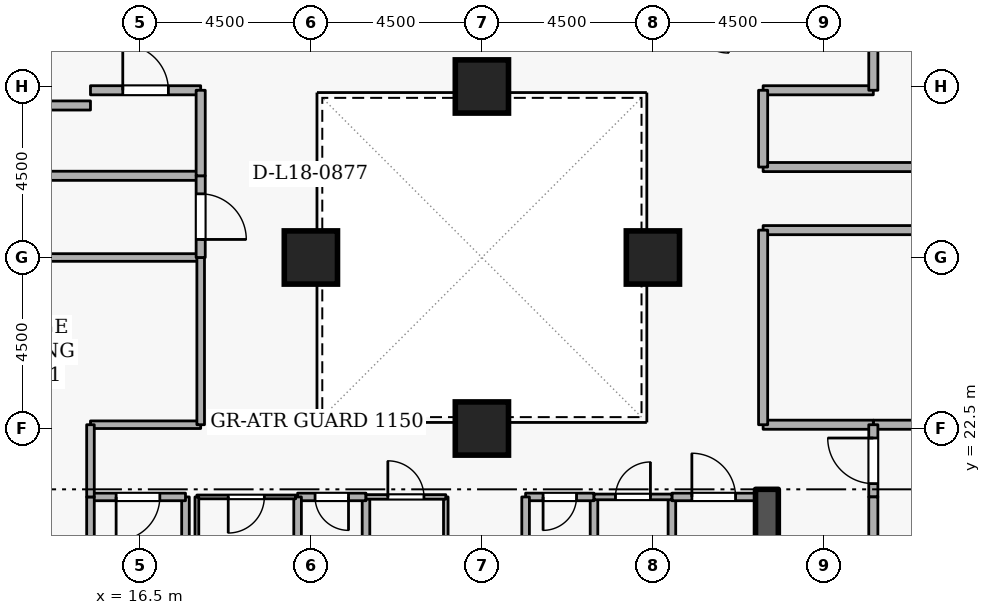
"""IFC4 building model, lengths in metres.
Left out: names, types, materials, properties, quantities, classifications, styles, units other than length and angle.
Written with IfcOpenShell. Run it as: python <this file> out.ifc"""

import sys

from ifc_helpers import new_model, si_unit, direction, frame, frame_2d, origin, origin_2d, place, context, subcontext, project, spatial, rectangle, extrude, element, fill, save


model = new_model("IFC4")
c1 = context("Model", 3, precision=1e-05, world=origin(), true_north=direction((0.0, 1.0)))
c2 = subcontext(c1, "Body", "Model", "MODEL_VIEW")
j1 = project(units=[si_unit("LENGTHUNIT", "METRE"), si_unit("PLANEANGLEUNIT", "RADIAN")], contexts=[c1])
p1 = place(None, origin())
s1 = spatial("IfcSite", under=j1, at=p1, CompositionType="ELEMENT")
p2 = place(p1, origin())
s2 = spatial("IfcBuilding", under=s1, at=p2, CompositionType="ELEMENT")
p3 = place(p2, frame((0.0, 0.0, 71.7)))
s3 = spatial("IfcBuildingStorey", under=s2, at=p3, CompositionType="ELEMENT", Elevation=71.7)
p4 = place(p3, frame((33.0, 15.2, 0.0), z_axis=(0.0, 0.0, 1.0), x_axis=(0.0, 1.0, 0.0)))
e1 = element("IfcWall", 1, at=p4, inside=s3, PredefinedType="SHEAR", context=c2, shape_type="SweptSolid", body=[
    extrude(rectangle(XDim=5.7, YDim=0.6, at=frame_2d((2.85, 0.0))), origin(), (0.0, 0.0, 1.0), 4.2),
])
for number, where, z_axis, x_axis in (
    (2, (25.5, 22.5, 0.0), (0.0, 0.0, 1.0), (1.0, 0.0, 0.0)),
    (3, (25.5, 31.5, 0.0), (0.0, 0.0, 1.0), (1.0, 0.0, 0.0)),
    (4, (21.0, 27.0, 0.0), (0.0, 0.0, 1.0), (1.0, 0.0, 0.0)),
    (5, (30.0, 27.0, 0.0), (0.0, 0.0, 1.0), (1.0, 0.0, 0.0)),
):
    element("IfcColumn", number, at=place(p3, frame(where, z_axis=z_axis, x_axis=x_axis)), inside=s3, PredefinedType="COLUMN", context=c2, shape_type="SweptSolid", body=[
        extrude(rectangle(XDim=1.4, YDim=1.4, at=origin_2d()), origin(), (0.0, 0.0, 1.0), 4.2),
    ])
p5 = place(p3, frame((17.7, 18.4, 0.0), z_axis=(0.0, 0.0, 1.0), x_axis=(0.0, 1.0, 0.0)))
e6 = element("IfcWall", 6, at=p5, inside=s3, PredefinedType="STANDARD", context=c2, shape_type="SweptSolid", body=[
    extrude(rectangle(XDim=2.3, YDim=0.2, at=frame_2d((1.15, 0.0))), origin(), (0.0, 0.0, 1.0), 3.065),
])
p6 = place(p3, frame((17.7, 20.7, 0.0), z_axis=(0.0, 0.0, 1.0), x_axis=(-1.0, 0.0, 0.0)))
e7 = element("IfcWall", 7, at=p6, inside=s3, PredefinedType="STANDARD", context=c2, shape_type="SweptSolid", body=[
    extrude(rectangle(XDim=2.5, YDim=0.2, at=frame_2d((1.25, 0.0))), origin(), (0.0, 0.0, 1.0), 3.86),
])
p7 = place(p6, frame((0.675, 0.0, 0.0)))
e8 = element("IfcOpeningElement", 8, at=p7, cuts=e7, PredefinedType="OPENING", context=c2, shape_type="SweptSolid", body=[
    extrude(rectangle(XDim=1.15, YDim=2.1, at=frame_2d((0.575, 1.05))), frame((0.0, 0.11, 0.0), z_axis=(0.0, -1.0, 0.0), x_axis=(1.0, 0.0, 0.0)), (0.0, 0.0, 1.0), 0.22),
])
p8 = place(p3, frame((15.2, 20.7, 0.0), z_axis=(0.0, 0.0, 1.0), x_axis=(0.0, -1.0, 0.0)))
e9 = element("IfcWall", 9, at=p8, inside=s3, PredefinedType="STANDARD", context=c2, shape_type="SweptSolid", body=[
    extrude(rectangle(XDim=5.7, YDim=0.2, at=frame_2d((2.85, 0.0))), origin(), (0.0, 0.0, 1.0), 3.86),
])
p9 = place(p8, frame((2.275, 0.0, 0.0)))
e10 = element("IfcOpeningElement", 10, at=p9, cuts=e9, PredefinedType="OPENING", context=c2, shape_type="SweptSolid", body=[
    extrude(rectangle(XDim=1.15, YDim=2.1, at=frame_2d((0.575, 1.05))), frame((0.0, 0.11, 0.0), z_axis=(0.0, -1.0, 0.0), x_axis=(1.0, 0.0, 0.0)), (0.0, 0.0, 1.0), 0.22),
])
p10 = place(p3, frame((28.45, 18.65, 0.0), z_axis=(0.0, 0.0, 1.0), x_axis=(0.0, 1.0, 0.0)))
e11 = element("IfcWall", 11, at=p10, inside=s3, PredefinedType="STANDARD", context=c2, shape_type="SweptSolid", body=[
    extrude(rectangle(XDim=2.05, YDim=0.2, at=frame_2d((1.025, 0.0))), origin(), (0.0, 0.0, 1.0), 3.86),
])
p11 = place(p3, frame((28.45, 20.7, 0.0), z_axis=(0.0, 0.0, 1.0), x_axis=(-1.0, 0.0, 0.0)))
e12 = element("IfcWall", 12, at=p11, inside=s3, PredefinedType="STANDARD", context=c2, shape_type="SweptSolid", body=[
    extrude(rectangle(XDim=1.8, YDim=0.2, at=frame_2d((0.9, 0.0))), origin(), (0.0, 0.0, 1.0), 3.86),
])
p12 = place(p11, frame((0.46, 0.0, 0.0)))
e13 = element("IfcOpeningElement", 13, at=p12, cuts=e12, PredefinedType="OPENING", context=c2, shape_type="SweptSolid", body=[
    extrude(rectangle(XDim=0.88, YDim=2.04, at=frame_2d((0.44, 1.02))), frame((0.0, 0.11, 0.0), z_axis=(0.0, -1.0, 0.0), x_axis=(1.0, 0.0, 0.0)), (0.0, 0.0, 1.0), 0.22),
])
for number, where, z_axis, x_axis in (
    (14, (26.65, 20.7, 0.0), (0.0, 0.0, 1.0), (0.0, -1.0, 0.0)),
    (15, (22.45, 18.65, 0.0), (0.0, 0.0, 1.0), (0.0, 1.0, 0.0)),
):
    element("IfcWall", number, at=place(p3, frame(where, z_axis=z_axis, x_axis=x_axis)), inside=s3, PredefinedType="STANDARD", context=c2, shape_type="SweptSolid", body=[
        extrude(rectangle(XDim=2.05, YDim=0.2, at=frame_2d((1.025, 0.0))), origin(), (0.0, 0.0, 1.0), 3.86),
    ])
p13 = place(p3, frame((22.45, 20.7, 0.0), z_axis=(0.0, 0.0, 1.0), x_axis=(-1.0, 0.0, 0.0)))
e16 = element("IfcWall", 16, at=p13, inside=s3, PredefinedType="STANDARD", context=c2, shape_type="SweptSolid", body=[
    extrude(rectangle(XDim=1.8, YDim=0.2, at=frame_2d((0.9, 0.0))), origin(), (0.0, 0.0, 1.0), 3.86),
])
p14 = place(p13, frame((0.46, 0.0, 0.0)))
e17 = element("IfcOpeningElement", 17, at=p14, cuts=e16, PredefinedType="OPENING", context=c2, shape_type="SweptSolid", body=[
    extrude(rectangle(XDim=0.88, YDim=2.04, at=frame_2d((0.44, 1.02))), frame((0.0, 0.11, 0.0), z_axis=(0.0, -1.0, 0.0), x_axis=(1.0, 0.0, 0.0)), (0.0, 0.0, 1.0), 0.22),
])
for number, where, z_axis, x_axis in (
    (18, (20.65, 20.7, 0.0), (0.0, 0.0, 1.0), (0.0, -1.0, 0.0)),
    (19, (30.5, 18.65, 0.0), (0.0, 0.0, 1.0), (0.0, 1.0, 0.0)),
):
    element("IfcWall", number, at=place(p3, frame(where, z_axis=z_axis, x_axis=x_axis)), inside=s3, PredefinedType="STANDARD", context=c2, shape_type="SweptSolid", body=[
        extrude(rectangle(XDim=2.05, YDim=0.2, at=frame_2d((1.025, 0.0))), origin(), (0.0, 0.0, 1.0), 3.86),
    ])
p15 = place(p3, frame((30.5, 20.7, 0.0), z_axis=(0.0, 0.0, 1.0), x_axis=(1.0, 0.0, 0.0)))
e20 = element("IfcWall", 20, at=p15, inside=s3, PredefinedType="STANDARD", context=c2, shape_type="SweptSolid", body=[
    extrude(rectangle(XDim=2.2, YDim=0.2, at=frame_2d((1.1, 0.0))), origin(), (0.0, 0.0, 1.0), 3.86),
])
p16 = place(p15, frame((0.525, 0.0, 0.0)))
e21 = element("IfcOpeningElement", 21, at=p16, cuts=e20, PredefinedType="OPENING", context=c2, shape_type="SweptSolid", body=[
    extrude(rectangle(XDim=1.15, YDim=2.1, at=frame_2d((0.575, 1.05))), frame((0.0, 0.11, 0.0), z_axis=(0.0, -1.0, 0.0), x_axis=(1.0, 0.0, 0.0)), (0.0, 0.0, 1.0), 0.22),
])
p17 = place(p3, frame((32.9, 27.72, 0.0), z_axis=(0.0, 0.0, 1.0), x_axis=(1.0, 0.0, 0.0)))
e22 = element("IfcWall", 22, at=p17, inside=s3, PredefinedType="STANDARD", context=c2, shape_type="SweptSolid", body=[
    extrude(rectangle(XDim=9.1, YDim=0.24, at=frame_2d((4.55, 0.0))), origin(), (0.0, 0.0, 1.0), 3.86),
])
p18 = place(p17, frame((3.95, 0.0, 0.0)))
e23 = element("IfcOpeningElement", 23, at=p18, cuts=e22, PredefinedType="OPENING", context=c2, shape_type="SweptSolid", body=[
    extrude(rectangle(XDim=1.2, YDim=2.1, at=frame_2d((0.6, 1.05))), frame((0.0, 0.13, 0.0), z_axis=(0.0, -1.0, 0.0), x_axis=(1.0, 0.0, 0.0)), (0.0, 0.0, 1.0), 0.26),
])
p19 = place(p3, frame((42.0, 22.6, 0.0), z_axis=(0.0, 0.0, 1.0), x_axis=(-1.0, 0.0, 0.0)))
e24 = element("IfcWall", 24, at=p19, inside=s3, PredefinedType="STANDARD", context=c2, shape_type="SweptSolid", body=[
    extrude(rectangle(XDim=6.2, YDim=0.24, at=frame_2d((3.1, 0.0))), origin(), (0.0, 0.0, 1.0), 3.86),
])
p20 = place(p3, frame((35.8, 22.6, 0.0), z_axis=(0.0, 0.0, 1.0), x_axis=(-1.0, 0.0, 0.0)))
e25 = element("IfcWall", 25, at=p20, inside=s3, PredefinedType="STANDARD", context=c2, shape_type="SweptSolid", body=[
    extrude(rectangle(XDim=2.9, YDim=0.24, at=frame_2d((1.45, 0.0))), origin(), (0.0, 0.0, 1.0), 3.86),
])
p21 = place(p3, frame((32.9, 22.6, 0.0), z_axis=(0.0, 0.0, 1.0), x_axis=(0.0, 1.0, 0.0)))
e26 = element("IfcWall", 26, at=p21, inside=s3, PredefinedType="STANDARD", context=c2, shape_type="SweptSolid", body=[
    extrude(rectangle(XDim=5.12, YDim=0.24, at=frame_2d((2.56, 0.0))), origin(), (0.0, 0.0, 1.0), 3.065),
])
p22 = place(p3, frame((32.9, 31.4, 0.0), z_axis=(0.0, 0.0, 1.0), x_axis=(1.0, 0.0, 0.0)))
e27 = element("IfcWall", 27, at=p22, inside=s3, PredefinedType="STANDARD", context=c2, shape_type="SweptSolid", body=[
    extrude(rectangle(XDim=2.9, YDim=0.24, at=frame_2d((1.45, 0.0))), origin(), (0.0, 0.0, 1.0), 3.86),
])
p23 = place(p3, frame((35.8, 31.4, 0.0), z_axis=(0.0, 0.0, 1.0), x_axis=(0.0, 1.0, 0.0)))
e28 = element("IfcWall", 28, at=p23, inside=s3, PredefinedType="STANDARD", context=c2, shape_type="SweptSolid", body=[
    extrude(rectangle(XDim=1.9, YDim=0.24, at=frame_2d((0.95, 0.0))), origin(), (0.0, 0.0, 1.0), 3.86),
])
p24 = place(p3, frame((42.0, 29.38, 0.0), z_axis=(0.0, 0.0, 1.0), x_axis=(-1.0, 0.0, 0.0)))
e29 = element("IfcWall", 29, at=p24, inside=s3, PredefinedType="STANDARD", context=c2, shape_type="SweptSolid", body=[
    extrude(rectangle(XDim=9.1, YDim=0.24, at=frame_2d((4.55, 0.0))), origin(), (0.0, 0.0, 1.0), 3.86),
])
p25 = place(p24, frame((3.95, 0.0, 0.0)))
e30 = element("IfcOpeningElement", 30, at=p25, cuts=e29, PredefinedType="OPENING", context=c2, shape_type="SweptSolid", body=[
    extrude(rectangle(XDim=1.2, YDim=2.1, at=frame_2d((0.6, 1.05))), frame((0.0, 0.13, 0.0), z_axis=(0.0, -1.0, 0.0), x_axis=(1.0, 0.0, 0.0)), (0.0, 0.0, 1.0), 0.26),
])
p26 = place(p3, frame((32.9, 29.38, 0.0), z_axis=(0.0, 0.0, 1.0), x_axis=(0.0, 1.0, 0.0)))
e31 = element("IfcWall", 31, at=p26, inside=s3, PredefinedType="STANDARD", context=c2, shape_type="SweptSolid", body=[
    extrude(rectangle(XDim=2.02, YDim=0.24, at=frame_2d((1.01, 0.0))), origin(), (0.0, 0.0, 1.0), 3.065),
])
p27 = place(p3, frame((18.1, 22.6, 0.0), z_axis=(0.0, 0.0, 1.0), x_axis=(-1.0, 0.0, 0.0)))
e32 = element("IfcWall", 32, at=p27, inside=s3, PredefinedType="STANDARD", context=c2, shape_type="SweptSolid", body=[
    extrude(rectangle(XDim=2.9, YDim=0.2, at=frame_2d((1.45, 0.0))), origin(), (0.0, 0.0, 1.0), 3.86),
])
p28 = place(p3, frame((15.2, 22.6, 0.0), z_axis=(0.0, 0.0, 1.0), x_axis=(0.0, -1.0, 0.0)))
e33 = element("IfcWall", 33, at=p28, inside=s3, PredefinedType="STANDARD", context=c2, shape_type="SweptSolid", body=[
    extrude(rectangle(XDim=1.9, YDim=0.2, at=frame_2d((0.95, 0.0))), origin(), (0.0, 0.0, 1.0), 3.86),
])
p29 = place(p3, frame((10.95, 27.0, 0.0), z_axis=(0.0, 0.0, 1.0), x_axis=(1.0, 0.0, 0.0)))
e34 = element("IfcWall", 34, at=p29, inside=s3, PredefinedType="STANDARD", context=c2, shape_type="SweptSolid", body=[
    extrude(rectangle(XDim=7.15, YDim=0.2, at=frame_2d((3.575, 0.0))), origin(), (0.0, 0.0, 1.0), 3.245),
])
p30 = place(p3, frame((18.1, 27.0, 0.0), z_axis=(0.0, 0.0, 1.0), x_axis=(0.0, -1.0, 0.0)))
e35 = element("IfcWall", 35, at=p30, inside=s3, PredefinedType="STANDARD", context=c2, shape_type="SweptSolid", body=[
    extrude(rectangle(XDim=4.4, YDim=0.2, at=frame_2d((2.2, 0.0))), origin(), (0.0, 0.0, 1.0), 3.065),
])
p31 = place(p3, frame((10.95, 29.15, 0.0), z_axis=(0.0, 0.0, 1.0), x_axis=(1.0, 0.0, 0.0)))
e36 = element("IfcWall", 36, at=p31, inside=s3, PredefinedType="STANDARD", context=c2, shape_type="SweptSolid", body=[
    extrude(rectangle(XDim=7.15, YDim=0.24, at=frame_2d((3.575, 0.0))), origin(), (0.0, 0.0, 1.0), 3.86),
])
p32 = place(p3, frame((18.1, 29.15, 0.0), z_axis=(0.0, 0.0, 1.0), x_axis=(0.0, -1.0, 0.0)))
e37 = element("IfcWall", 37, at=p32, inside=s3, PredefinedType="STANDARD", context=c2, shape_type="SweptSolid", body=[
    extrude(rectangle(XDim=2.15, YDim=0.24, at=frame_2d((1.075, 0.0))), origin(), (0.0, 0.0, 1.0), 3.065),
])
p33 = place(p32, frame((0.475, 0.0, 0.0)))
e38 = element("IfcOpeningElement", 38, at=p33, cuts=e37, PredefinedType="OPENING", context=c2, shape_type="SweptSolid", body=[
    extrude(rectangle(XDim=1.2, YDim=2.1, at=frame_2d((0.6, 1.05))), frame((0.0, 0.13, 0.0), z_axis=(0.0, -1.0, 0.0), x_axis=(1.0, 0.0, 0.0)), (0.0, 0.0, 1.0), 0.26),
])
p34 = place(p3, frame((15.2, 31.4, 0.0), z_axis=(0.0, 0.0, 1.0), x_axis=(1.0, 0.0, 0.0)))
e39 = element("IfcWall", 39, at=p34, inside=s3, PredefinedType="STANDARD", context=c2, shape_type="SweptSolid", body=[
    extrude(rectangle(XDim=2.9, YDim=0.24, at=frame_2d((1.45, 0.0))), origin(), (0.0, 0.0, 1.0), 3.86),
])
p35 = place(p34, frame((0.85, 0.0, 0.0)))
e40 = element("IfcOpeningElement", 40, at=p35, cuts=e39, PredefinedType="OPENING", context=c2, shape_type="SweptSolid", body=[
    extrude(rectangle(XDim=1.2, YDim=2.1, at=frame_2d((0.6, 1.05))), frame((0.0, 0.13, 0.0), z_axis=(0.0, -1.0, 0.0), x_axis=(1.0, 0.0, 0.0)), (0.0, 0.0, 1.0), 0.26),
])
p36 = place(p3, frame((18.1, 31.4, 0.0), z_axis=(0.0, 0.0, 1.0), x_axis=(0.0, -1.0, 0.0)))
e41 = element("IfcWall", 41, at=p36, inside=s3, PredefinedType="STANDARD", context=c2, shape_type="SweptSolid", body=[
    extrude(rectangle(XDim=2.25, YDim=0.24, at=frame_2d((1.125, 0.0))), origin(), (0.0, 0.0, 1.0), 3.065),
])
p37 = place(p3, frame((10.95, 31.0, 0.0), z_axis=(0.0, 0.0, 1.0), x_axis=(1.0, 0.0, 0.0)))
e42 = element("IfcWall", 42, at=p37, inside=s3, PredefinedType="STANDARD", context=c2, shape_type="SweptSolid", body=[
    extrude(rectangle(XDim=4.25, YDim=0.24, at=frame_2d((2.125, 0.0))), origin(), (0.0, 0.0, 1.0), 3.86),
])
p38 = place(p3, frame((35.8, 20.7, 0.0), z_axis=(0.0, 0.0, 1.0), x_axis=(0.0, 1.0, 0.0)))
e43 = element("IfcWall", 43, at=p38, inside=s3, PredefinedType="STANDARD", context=c2, shape_type="SweptSolid", body=[
    extrude(rectangle(XDim=1.9, YDim=0.24, at=frame_2d((0.95, 0.0))), origin(), (0.0, 0.0, 1.0), 3.86),
])
p39 = place(p38, frame((0.35, 0.0, 0.0)))
e44 = element("IfcOpeningElement", 44, at=p39, cuts=e43, PredefinedType="OPENING", context=c2, shape_type="SweptSolid", body=[
    extrude(rectangle(XDim=1.2, YDim=2.1, at=frame_2d((0.6, 1.05))), frame((0.0, 0.13, 0.0), z_axis=(0.0, -1.0, 0.0), x_axis=(1.0, 0.0, 0.0)), (0.0, 0.0, 1.0), 0.26),
])
p40 = place(p3, frame((35.8, 17.648, 0.0), z_axis=(0.0, 0.0, 1.0), x_axis=(0.0, 1.0, 0.0)))
e45 = element("IfcWall", 45, at=p40, inside=s3, PredefinedType="STANDARD", context=c2, shape_type="SweptSolid", body=[
    extrude(rectangle(XDim=3.052, YDim=0.24, at=frame_2d((1.526, 0.0))), origin(), (0.0, 0.0, 1.0), 3.86),
])
p41 = place(p3, frame((20.6, 20.7, 0.0), z_axis=(0.0, 0.0, 1.0), x_axis=(-1.0, 0.0, 0.0)))
e46 = element("IfcWall", 46, at=p41, inside=s3, PredefinedType="PARTITIONING", context=c2, shape_type="SweptSolid", body=[
    extrude(rectangle(XDim=2.6, YDim=0.1, at=frame_2d((1.3, 0.0))), origin(), (0.0, 0.0, 1.0), 3.86),
])
p42 = place(p41, frame((0.825, 0.0, 0.0)))
e47 = element("IfcOpeningElement", 47, at=p42, cuts=e46, PredefinedType="OPENING", context=c2, shape_type="SweptSolid", body=[
    extrude(rectangle(XDim=0.95, YDim=2.1, at=frame_2d((0.475, 1.05))), frame((0.0, 0.06, 0.0), z_axis=(0.0, -1.0, 0.0), x_axis=(1.0, 0.0, 0.0)), (0.0, 0.0, 1.0), 0.12),
])
p43 = place(p3, frame((18.0, 20.7, 0.0), z_axis=(0.0, 0.0, 1.0), x_axis=(0.0, -1.0, 0.0)))
e48 = element("IfcWall", 48, at=p43, inside=s3, PredefinedType="PARTITIONING", context=c2, shape_type="SweptSolid", body=[
    extrude(rectangle(XDim=2.05, YDim=0.1, at=frame_2d((1.025, 0.0))), origin(), (0.0, 0.0, 1.0), 3.065),
])
p44 = place(p3, frame((24.55, 20.7, 0.0), z_axis=(0.0, 0.0, 1.0), x_axis=(0.0, -1.0, 0.0)))
e49 = element("IfcWall", 49, at=p44, inside=s3, PredefinedType="PARTITIONING", context=c2, shape_type="SweptSolid", body=[
    extrude(rectangle(XDim=2.05, YDim=0.12, at=frame_2d((1.025, 0.0))), origin(), (0.0, 0.0, 1.0), 3.86),
])
p45 = place(p3, frame((22.45, 20.7, 0.0), z_axis=(0.0, 0.0, 1.0), x_axis=(1.0, 0.0, 0.0)))
e50 = element("IfcWall", 50, at=p45, inside=s3, PredefinedType="PARTITIONING", context=c2, shape_type="SweptSolid", body=[
    extrude(rectangle(XDim=2.1, YDim=0.12, at=frame_2d((1.05, 0.0))), origin(), (0.0, 0.0, 1.0), 3.86),
])
p46 = place(p45, frame((0.575, 0.0, 0.0)))
e51 = element("IfcOpeningElement", 51, at=p46, cuts=e50, PredefinedType="OPENING", context=c2, shape_type="SweptSolid", body=[
    extrude(rectangle(XDim=0.95, YDim=2.1, at=frame_2d((0.475, 1.05))), frame((0.0, 0.07, 0.0), z_axis=(0.0, -1.0, 0.0), x_axis=(1.0, 0.0, 0.0)), (0.0, 0.0, 1.0), 0.14),
])
p47 = place(p3, frame((28.45, 20.7, 0.0), z_axis=(0.0, 0.0, 1.0), x_axis=(1.0, 0.0, 0.0)))
e52 = element("IfcWall", 52, at=p47, inside=s3, PredefinedType="PARTITIONING", context=c2, shape_type="SweptSolid", body=[
    extrude(rectangle(XDim=2.05, YDim=0.15, at=frame_2d((1.025, 0.0))), origin(), (0.0, 0.0, 1.0), 3.86),
])
p48 = place(p47, frame((0.565, 0.0, 0.0)))
e53 = element("IfcOpeningElement", 53, at=p48, cuts=e52, PredefinedType="OPENING", context=c2, shape_type="SweptSolid", body=[
    extrude(rectangle(XDim=0.92, YDim=2.08, at=frame_2d((0.46, 1.04))), frame((0.0, 0.085, 0.0), z_axis=(0.0, -1.0, 0.0), x_axis=(1.0, 0.0, 0.0)), (0.0, 0.0, 1.0), 0.17),
])
p49 = place(p7, origin())
e54 = element("IfcDoor", 54, at=p49, inside=s3, OperationType="SINGLE_SWING_RIGHT", PredefinedType="DOOR", context=c2, shape_type="SweptSolid", body=[
    extrude(rectangle(XDim=1.15, YDim=2.1, at=frame_2d((0.575, 1.05))), frame((0.0, 0.025, 0.0), z_axis=(0.0, -1.0, 0.0), x_axis=(1.0, 0.0, 0.0)), (0.0, 0.0, 1.0), 0.05),
])
fill(e8, e54)
p50 = place(p12, origin())
e55 = element("IfcDoor", 55, at=p50, inside=s3, OperationType="SINGLE_SWING_RIGHT", PredefinedType="DOOR", context=c2, shape_type="SweptSolid", body=[
    extrude(rectangle(XDim=0.88, YDim=2.04, at=frame_2d((0.44, 1.02))), frame((0.0, 0.025, 0.0), z_axis=(0.0, -1.0, 0.0), x_axis=(1.0, 0.0, 0.0)), (0.0, 0.0, 1.0), 0.05),
])
fill(e13, e55)
p51 = place(p14, origin())
e56 = element("IfcDoor", 56, at=p51, inside=s3, OperationType="SINGLE_SWING_LEFT", PredefinedType="DOOR", context=c2, shape_type="SweptSolid", body=[
    extrude(rectangle(XDim=0.88, YDim=2.04, at=frame_2d((0.44, 1.02))), frame((0.0, 0.025, 0.0), z_axis=(0.0, -1.0, 0.0), x_axis=(1.0, 0.0, 0.0)), (0.0, 0.0, 1.0), 0.05),
])
fill(e17, e56)
p52 = place(p42, origin())
e57 = element("IfcDoor", 57, at=p52, inside=s3, OperationType="SINGLE_SWING_RIGHT", PredefinedType="DOOR", context=c2, shape_type="SweptSolid", body=[
    extrude(rectangle(XDim=0.95, YDim=2.1, at=frame_2d((0.475, 1.05))), frame((0.0, 0.025, 0.0), z_axis=(0.0, -1.0, 0.0), x_axis=(1.0, 0.0, 0.0)), (0.0, 0.0, 1.0), 0.05),
])
fill(e47, e57)
p53 = place(p46, origin())
e58 = element("IfcDoor", 58, at=p53, inside=s3, OperationType="SINGLE_SWING_LEFT", PredefinedType="DOOR", context=c2, shape_type="SweptSolid", body=[
    extrude(rectangle(XDim=0.95, YDim=2.1, at=frame_2d((0.475, 1.05))), frame((0.0, 0.025, 0.0), z_axis=(0.0, -1.0, 0.0), x_axis=(1.0, 0.0, 0.0)), (0.0, 0.0, 1.0), 0.05),
])
fill(e51, e58)
p54 = place(p48, origin())
e59 = element("IfcDoor", 59, at=p54, inside=s3, OperationType="SINGLE_SWING_RIGHT", PredefinedType="DOOR", context=c2, shape_type="SweptSolid", body=[
    extrude(rectangle(XDim=0.92, YDim=2.08, at=frame_2d((0.46, 1.04))), frame((0.0, 0.025, 0.0), z_axis=(0.0, -1.0, 0.0), x_axis=(1.0, 0.0, 0.0)), (0.0, 0.0, 1.0), 0.05),
])
fill(e53, e59)
p55 = place(p16, origin())
e60 = element("IfcDoor", 60, at=p55, inside=s3, OperationType="SINGLE_SWING_LEFT", PredefinedType="DOOR", context=c2, shape_type="SweptSolid", body=[
    extrude(rectangle(XDim=1.15, YDim=2.1, at=frame_2d((0.575, 1.05))), frame((0.0, 0.025, 0.0), z_axis=(0.0, -1.0, 0.0), x_axis=(1.0, 0.0, 0.0)), (0.0, 0.0, 1.0), 0.05),
])
fill(e21, e60)
p56 = place(p33, origin())
e61 = element("IfcDoor", 61, at=p56, inside=s3, OperationType="SINGLE_SWING_RIGHT", PredefinedType="DOOR", context=c2, shape_type="SweptSolid", body=[
    extrude(rectangle(XDim=1.2, YDim=2.1, at=frame_2d((0.6, 1.05))), frame((0.0, 0.025, 0.0), z_axis=(0.0, -1.0, 0.0), x_axis=(1.0, 0.0, 0.0)), (0.0, 0.0, 1.0), 0.05),
])
fill(e38, e61)
p57 = place(p35, origin())
e62 = element("IfcDoor", 62, at=p57, inside=s3, OperationType="SINGLE_SWING_LEFT", PredefinedType="DOOR", context=c2, shape_type="SweptSolid", body=[
    extrude(rectangle(XDim=1.2, YDim=2.1, at=frame_2d((0.6, 1.05))), frame((0.0, 0.025, 0.0), z_axis=(0.0, -1.0, 0.0), x_axis=(1.0, 0.0, 0.0)), (0.0, 0.0, 1.0), 0.05),
])
fill(e40, e62)
p58 = place(p39, origin())
e63 = element("IfcDoor", 63, at=p58, inside=s3, OperationType="SINGLE_SWING_RIGHT", PredefinedType="DOOR", context=c2, shape_type="SweptSolid", body=[
    extrude(rectangle(XDim=1.2, YDim=2.1, at=frame_2d((0.6, 1.05))), frame((0.0, 0.025, 0.0), z_axis=(0.0, -1.0, 0.0), x_axis=(1.0, 0.0, 0.0)), (0.0, 0.0, 1.0), 0.05),
])
fill(e44, e63)
save(model, sys.argv[1])
